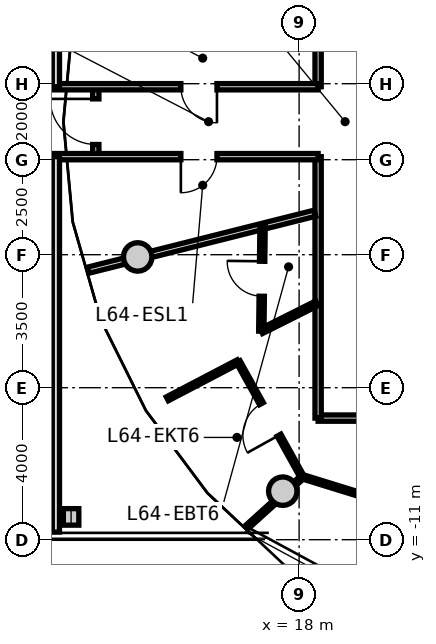
"""IFC4 building model, lengths in metres.
Left out: names, types, materials, properties, quantities, classifications, styles, units other than length and angle.
Written with IfcOpenShell. Run it as: python <this file> out.ifc"""

import sys

from ifc_helpers import new_model, si_unit, direction, frame, frame_2d, origin, origin_2d, place, context, subcontext, project, spatial, rectangle, circle, i_section, extrude, source, transform, mapped, element, fill, save


model = new_model("IFC4")
c1 = context("Model", 3, precision=1e-05, world=origin(), true_north=direction((0.0, 1.0)))
c2 = subcontext(c1, "Body", "Model", "MODEL_VIEW")
j1 = project(units=[si_unit("LENGTHUNIT", "METRE"), si_unit("PLANEANGLEUNIT", "RADIAN")], contexts=[c1])
p1 = place(None, origin())
s1 = spatial("IfcSite", under=j1, at=p1, CompositionType="ELEMENT")
p2 = place(p1, origin())
s2 = spatial("IfcBuilding", under=s1, at=p2, CompositionType="ELEMENT")
p3 = place(p2, frame((0.0, 0.0, 207.8)))
s3 = spatial("IfcBuildingStorey", under=s2, at=p3, CompositionType="ELEMENT", Elevation=207.8)
m1 = source(origin(), c2, "Body", "SweptSolid", [
    extrude(circle(Radius=0.375, at=origin_2d()), origin(), (0.0, 0.0, 1.0), 3.05),
])
for number, where, z_axis, x_axis in (
    (1, (13.753, -3.559, 0.0), (0.0, 0.0, 1.0), (1.0, 0.0, 0.0)),
    (2, (17.57, -9.723, 0.0), (0.0, 0.0, 1.0), (1.0, 0.0, 0.0)),
):
    element("IfcColumn", number, at=place(p3, frame(where, z_axis=z_axis, x_axis=x_axis)), inside=s3, PredefinedType="COLUMN", context=c2, shape_type="MappedRepresentation", body=[
        mapped(m1, transform((0.0, 0.0, 0.0), x_axis=(1.0, 0.0, 0.0), y_axis=(0.0, 1.0, 0.0), z_axis=(0.0, 0.0, 1.0), scale=1.0)),
    ])
m2 = source(origin(), c2, "Body", "SweptSolid", [
    extrude(i_section(OverallWidth=0.407, OverallDepth=0.435, WebThickness=0.024, FlangeThickness=0.039, FilletRadius=0.015, at=origin_2d()), origin(), (0.0, 0.0, 1.0), 3.05),
])
p4 = place(p3, frame((12.0, -10.4, 0.0), z_axis=(0.0, 0.0, 1.0), x_axis=(1.0, 0.0, 0.0)))
e3 = element("IfcColumn", 3, at=p4, inside=s3, PredefinedType="COLUMN", context=c2, shape_type="MappedRepresentation", body=[
    mapped(m2, transform((0.0, 0.0, 0.0), x_axis=(1.0, 0.0, 0.0), y_axis=(0.0, 1.0, 0.0), z_axis=(0.0, 0.0, 1.0), scale=1.0)),
])
m3 = source(origin(), c2, "Body", "SweptSolid", [
    extrude(rectangle(XDim=19.0, YDim=0.165, at=frame_2d((9.5, 0.0))), origin(), (0.0, 0.0, 1.0), 2.745),
])
p5 = place(p3, frame((37.5, -7.8, 0.0), z_axis=(0.0, 0.0, 1.0), x_axis=(-1.0, 0.0, 0.0)))
e4 = element("IfcWall", 4, at=p5, inside=s3, PredefinedType="PARTITIONING", context=c2, shape_type="MappedRepresentation", body=[
    mapped(m3, transform((0.0, 0.0, 0.0), x_axis=(1.0, 0.0, 0.0), y_axis=(0.0, 1.0, 0.0), z_axis=(0.0, 0.0, 1.0), scale=1.0)),
])
p6 = place(p5, frame((12.473, 0.0, 0.0)))
e5 = element("IfcOpeningElement", 5, at=p6, cuts=e4, PredefinedType="OPENING", context=c2, shape_type="SweptSolid", body=[
    extrude(rectangle(XDim=1.05, YDim=2.15, at=frame_2d((0.525, 1.075))), frame((0.0, 0.093, 0.0), z_axis=(0.0, -1.0, 0.0), x_axis=(1.0, 0.0, 0.0)), (0.0, 0.0, 1.0), 0.185),
])
m4 = source(origin(), c2, "Body", "SweptSolid", [
    extrude(rectangle(XDim=6.88, YDim=0.165, at=frame_2d((3.44, 0.0))), origin(), (0.0, 0.0, 1.0), 2.745),
])
p7 = place(p3, frame((18.5, -7.8, 0.0), z_axis=(0.0, 0.0, 1.0), x_axis=(0.0, 1.0, 0.0)))
e6 = element("IfcWall", 6, at=p7, inside=s3, PredefinedType="PARTITIONING", context=c2, shape_type="MappedRepresentation", body=[
    mapped(m4, transform((0.0, 0.0, 0.0), x_axis=(1.0, 0.0, 0.0), y_axis=(0.0, 1.0, 0.0), z_axis=(0.0, 0.0, 1.0), scale=1.0)),
])
p8 = place(p3, frame((18.5, 0.92, 0.0), z_axis=(0.0, 0.0, 1.0), x_axis=(0.0, 1.0, 0.0)))
e7 = element("IfcWall", 7, at=p8, inside=s3, PredefinedType="PARTITIONING", context=c2, shape_type="MappedRepresentation", body=[
    mapped(m4, transform((0.0, 0.0, 0.0), x_axis=(1.0, 0.0, 0.0), y_axis=(0.0, 1.0, 0.0), z_axis=(0.0, 0.0, 1.0), scale=1.0)),
])
p9 = place(p8, frame((5.525, 0.0, 0.0)))
e8 = element("IfcOpeningElement", 8, at=p9, cuts=e7, PredefinedType="OPENING", context=c2, shape_type="SweptSolid", body=[
    extrude(rectangle(XDim=0.92, YDim=2.1, at=frame_2d((0.46, 1.05))), frame((0.0, 0.093, 0.0), z_axis=(0.0, -1.0, 0.0), x_axis=(1.0, 0.0, 0.0)), (0.0, 0.0, 1.0), 0.185),
])
p10 = place(p8, frame((2.962, 0.0, 0.0)))
e9 = element("IfcOpeningElement", 9, at=p10, cuts=e7, PredefinedType="OPENING", context=c2, shape_type="SweptSolid", body=[
    extrude(rectangle(XDim=0.92, YDim=2.1, at=frame_2d((0.46, 1.05))), frame((0.0, 0.093, 0.0), z_axis=(0.0, -1.0, 0.0), x_axis=(1.0, 0.0, 0.0)), (0.0, 0.0, 1.0), 0.185),
])
m5 = source(origin(), c2, "Body", "SweptSolid", [
    extrude(rectangle(XDim=6.157, YDim=0.165, at=frame_2d((3.079, 0.0))), origin(), (0.0, 0.0, 1.0), 2.345),
])
p11 = place(p3, frame((18.42, -2.407, 0.0), z_axis=(0.0, 0.0, 1.0), x_axis=(-0.969840867184, -0.243738984038, 0.0)))
e10 = element("IfcWall", 10, at=p11, inside=s3, PredefinedType="PARTITIONING", context=c2, shape_type="MappedRepresentation", body=[
    mapped(m5, transform((0.0, 0.0, 0.0), x_axis=(1.0, 0.0, 0.0), y_axis=(0.0, 1.0, 0.0), z_axis=(0.0, 0.0, 1.0), scale=1.0)),
])
m6 = source(origin(), c2, "Body", "SweptSolid", [
    extrude(rectangle(XDim=6.98, YDim=0.115, at=frame_2d((3.49, 0.0))), origin(), (0.0, 0.0, 1.0), 2.745),
])
p12 = place(p3, frame((18.091, -9.344, 0.0), z_axis=(0.0, 0.0, 1.0), x_axis=(0.955342331637, -0.295501318749, 0.0)))
e11 = element("IfcWall", 11, at=p12, inside=s3, PredefinedType="PARTITIONING", context=c2, shape_type="MappedRepresentation", body=[
    mapped(m6, transform((0.0, 0.0, 0.0), x_axis=(1.0, 0.0, 0.0), y_axis=(0.0, 1.0, 0.0), z_axis=(0.0, 0.0, 1.0), scale=1.0)),
])
p13 = place(p12, frame((3.015, 0.0, 0.0)))
e12 = element("IfcOpeningElement", 12, at=p13, cuts=e11, PredefinedType="OPENING", context=c2, shape_type="SweptSolid", body=[
    extrude(rectangle(XDim=0.95, YDim=2.1, at=frame_2d((0.475, 1.05))), frame((0.0, 0.067, 0.0), z_axis=(0.0, -1.0, 0.0), x_axis=(1.0, 0.0, 0.0)), (0.0, 0.0, 1.0), 0.135),
])
m7 = source(origin(), c2, "Body", "SweptSolid", [
    extrude(rectangle(XDim=1.988, YDim=0.115, at=frame_2d((0.994, 0.0))), origin(), (0.0, 0.0, 1.0), 2.345),
])
p14 = place(p3, frame((18.091, -9.344, 0.0), z_axis=(0.0, 0.0, 1.0), x_axis=(-0.741992301729, -0.670408401033, 0.0)))
e13 = element("IfcWall", 13, at=p14, inside=s3, PredefinedType="PARTITIONING", context=c2, shape_type="MappedRepresentation", body=[
    mapped(m7, transform((0.0, 0.0, 0.0), x_axis=(1.0, 0.0, 0.0), y_axis=(0.0, 1.0, 0.0), z_axis=(0.0, 0.0, 1.0), scale=1.0)),
])
m8 = source(origin(), c2, "Body", "SweptSolid", [
    extrude(rectangle(XDim=1.638, YDim=0.14, at=frame_2d((0.819, 0.0))), origin(), (0.0, 0.0, 1.0), 2.745),
])
p15 = place(p3, frame((18.47, -4.778, 0.0), z_axis=(0.0, 0.0, 1.0), x_axis=(-0.893919977945, -0.448226586707, 0.0)))
e14 = element("IfcWall", 14, at=p15, inside=s3, PredefinedType="PARTITIONING", context=c2, shape_type="MappedRepresentation", body=[
    mapped(m8, transform((0.0, 0.0, 0.0), x_axis=(1.0, 0.0, 0.0), y_axis=(0.0, 1.0, 0.0), z_axis=(0.0, 0.0, 1.0), scale=1.0)),
])
m9 = source(origin(), c2, "Body", "SweptSolid", [
    extrude(rectangle(XDim=2.759, YDim=0.14, at=frame_2d((1.379, 0.0))), origin(), (0.0, 0.0, 1.0), 2.745),
])
p16 = place(p3, frame((17.005, -5.513, 0.0), z_axis=(0.0, 0.0, 1.0), x_axis=(0.01194710728, 0.999928630767, 0.0)))
e15 = element("IfcWall", 15, at=p16, inside=s3, PredefinedType="PARTITIONING", context=c2, shape_type="MappedRepresentation", body=[
    mapped(m9, transform((0.0, 0.0, 0.0), x_axis=(1.0, 0.0, 0.0), y_axis=(0.0, 1.0, 0.0), z_axis=(0.0, 0.0, 1.0), scale=1.0)),
])
p17 = place(p16, frame((0.919, 0.0, 0.0)))
e16 = element("IfcOpeningElement", 16, at=p17, cuts=e15, PredefinedType="OPENING", context=c2, shape_type="SweptSolid", body=[
    extrude(rectangle(XDim=0.92, YDim=2.1, at=frame_2d((0.46, 1.05))), frame((0.0, 0.08, 0.0), z_axis=(0.0, -1.0, 0.0), x_axis=(1.0, 0.0, 0.0)), (0.0, 0.0, 1.0), 0.16),
])
m10 = source(origin(), c2, "Body", "SweptSolid", [
    extrude(rectangle(XDim=2.104, YDim=0.115, at=frame_2d((1.052, 0.0))), origin(), (0.0, 0.0, 1.0), 2.745),
])
p18 = place(p3, frame((16.396, -6.317, 0.0), z_axis=(0.0, 0.0, 1.0), x_axis=(-0.886060817493, -0.463569010724, 0.0)))
e17 = element("IfcWall", 17, at=p18, inside=s3, PredefinedType="PARTITIONING", context=c2, shape_type="MappedRepresentation", body=[
    mapped(m10, transform((0.0, 0.0, 0.0), x_axis=(1.0, 0.0, 0.0), y_axis=(0.0, 1.0, 0.0), z_axis=(0.0, 0.0, 1.0), scale=1.0)),
])
m11 = source(origin(), c2, "Body", "SweptSolid", [
    extrude(rectangle(XDim=3.472, YDim=0.115, at=frame_2d((1.736, 0.0))), origin(), (0.0, 0.0, 1.0), 2.745),
])
p19 = place(p3, frame((16.396, -6.317, 0.0), z_axis=(0.0, 0.0, 1.0), x_axis=(0.485804139346, -0.874067696574, 0.0)))
e18 = element("IfcWall", 18, at=p19, inside=s3, PredefinedType="PARTITIONING", context=c2, shape_type="MappedRepresentation", body=[
    mapped(m11, transform((0.0, 0.0, 0.0), x_axis=(1.0, 0.0, 0.0), y_axis=(0.0, 1.0, 0.0), z_axis=(0.0, 0.0, 1.0), scale=1.0)),
])
p20 = place(p19, frame((1.261, 0.0, 0.0)))
e19 = element("IfcOpeningElement", 19, at=p20, cuts=e18, PredefinedType="OPENING", context=c2, shape_type="SweptSolid", body=[
    extrude(rectangle(XDim=0.95, YDim=2.1, at=frame_2d((0.475, 1.05))), frame((0.0, 0.067, 0.0), z_axis=(0.0, -1.0, 0.0), x_axis=(1.0, 0.0, 0.0)), (0.0, 0.0, 1.0), 0.135),
])
m12 = source(origin(), c2, "Body", "SweptSolid", [
    extrude(rectangle(XDim=1.84, YDim=0.165, at=frame_2d((0.92, 0.0))), origin(), (0.0, 0.0, 1.0), 2.745),
])
p21 = place(p3, frame((12.65, -0.92, 0.0), z_axis=(0.0, 0.0, 1.0), x_axis=(0.0, 1.0, 0.0)))
e20 = element("IfcWall", 20, at=p21, inside=s3, PredefinedType="PARTITIONING", context=c2, shape_type="MappedRepresentation", body=[
    mapped(m12, transform((0.0, 0.0, 0.0), x_axis=(1.0, 0.0, 0.0), y_axis=(0.0, 1.0, 0.0), z_axis=(0.0, 0.0, 1.0), scale=1.0)),
])
p22 = place(p21, frame((0.32, 0.0, 0.0)))
e21 = element("IfcOpeningElement", 21, at=p22, cuts=e20, PredefinedType="OPENING", context=c2, shape_type="SweptSolid", body=[
    extrude(rectangle(XDim=1.2, YDim=2.15, at=frame_2d((0.6, 1.075))), frame((0.0, 0.093, 0.0), z_axis=(0.0, -1.0, 0.0), x_axis=(1.0, 0.0, 0.0)), (0.0, 0.0, 1.0), 0.185),
])
m13 = source(origin(), c2, "Body", "SweptSolid", [
    extrude(rectangle(XDim=37.0, YDim=0.165, at=frame_2d((18.5, 0.0))), origin(), (0.0, 0.0, 1.0), 2.745),
])
p23 = place(p3, frame((-18.5, -0.92, 0.0), z_axis=(0.0, 0.0, 1.0), x_axis=(1.0, 0.0, 0.0)))
e22 = element("IfcWall", 22, at=p23, inside=s3, PredefinedType="PARTITIONING", context=c2, shape_type="MappedRepresentation", body=[
    mapped(m13, transform((0.0, 0.0, 0.0), x_axis=(1.0, 0.0, 0.0), y_axis=(0.0, 1.0, 0.0), z_axis=(0.0, 0.0, 1.0), scale=1.0)),
])
p24 = place(p23, frame((2.662, 0.0, 0.0)))
e23 = element("IfcOpeningElement", 23, at=p24, cuts=e22, PredefinedType="OPENING", context=c2, shape_type="SweptSolid", body=[
    extrude(rectangle(XDim=0.95, YDim=2.1, at=frame_2d((0.475, 1.05))), frame((0.0, 0.093, 0.0), z_axis=(0.0, -1.0, 0.0), x_axis=(1.0, 0.0, 0.0)), (0.0, 0.0, 1.0), 0.185),
])
p25 = place(p23, frame((33.388, 0.0, 0.0)))
e24 = element("IfcOpeningElement", 24, at=p25, cuts=e22, PredefinedType="OPENING", context=c2, shape_type="SweptSolid", body=[
    extrude(rectangle(XDim=0.95, YDim=2.1, at=frame_2d((0.475, 1.05))), frame((0.0, 0.093, 0.0), z_axis=(0.0, -1.0, 0.0), x_axis=(1.0, 0.0, 0.0)), (0.0, 0.0, 1.0), 0.185),
])
p26 = place(p23, frame((9.075, 0.0, 0.0)))
e25 = element("IfcOpeningElement", 25, at=p26, cuts=e22, PredefinedType="OPENING", context=c2, shape_type="SweptSolid", body=[
    extrude(rectangle(XDim=1.25, YDim=2.2, at=frame_2d((0.625, 1.1))), frame((0.0, 0.093, 0.0), z_axis=(0.0, -1.0, 0.0), x_axis=(1.0, 0.0, 0.0)), (0.0, 0.0, 1.0), 0.185),
])
p27 = place(p23, frame((14.875, 0.0, 0.0)))
e26 = element("IfcOpeningElement", 26, at=p27, cuts=e22, PredefinedType="OPENING", context=c2, shape_type="SweptSolid", body=[
    extrude(rectangle(XDim=1.25, YDim=2.2, at=frame_2d((0.625, 1.1))), frame((0.0, 0.093, 0.0), z_axis=(0.0, -1.0, 0.0), x_axis=(1.0, 0.0, 0.0)), (0.0, 0.0, 1.0), 0.185),
])
p28 = place(p23, frame((20.875, 0.0, 0.0)))
e27 = element("IfcOpeningElement", 27, at=p28, cuts=e22, PredefinedType="OPENING", context=c2, shape_type="SweptSolid", body=[
    extrude(rectangle(XDim=1.25, YDim=2.2, at=frame_2d((0.625, 1.1))), frame((0.0, 0.093, 0.0), z_axis=(0.0, -1.0, 0.0), x_axis=(1.0, 0.0, 0.0)), (0.0, 0.0, 1.0), 0.185),
])
p29 = place(p23, frame((26.675, 0.0, 0.0)))
e28 = element("IfcOpeningElement", 28, at=p29, cuts=e22, PredefinedType="OPENING", context=c2, shape_type="SweptSolid", body=[
    extrude(rectangle(XDim=1.25, YDim=2.2, at=frame_2d((0.625, 1.1))), frame((0.0, 0.093, 0.0), z_axis=(0.0, -1.0, 0.0), x_axis=(1.0, 0.0, 0.0)), (0.0, 0.0, 1.0), 0.185),
])
p30 = place(p3, frame((-18.5, 0.92, 0.0), z_axis=(0.0, 0.0, 1.0), x_axis=(1.0, 0.0, 0.0)))
e29 = element("IfcWall", 29, at=p30, inside=s3, PredefinedType="PARTITIONING", context=c2, shape_type="MappedRepresentation", body=[
    mapped(m13, transform((0.0, 0.0, 0.0), x_axis=(1.0, 0.0, 0.0), y_axis=(0.0, 1.0, 0.0), z_axis=(0.0, 0.0, 1.0), scale=1.0)),
])
p31 = place(p30, frame((2.662, 0.0, 0.0)))
e30 = element("IfcOpeningElement", 30, at=p31, cuts=e29, PredefinedType="OPENING", context=c2, shape_type="SweptSolid", body=[
    extrude(rectangle(XDim=0.95, YDim=2.1, at=frame_2d((0.475, 1.05))), frame((0.0, 0.093, 0.0), z_axis=(0.0, -1.0, 0.0), x_axis=(1.0, 0.0, 0.0)), (0.0, 0.0, 1.0), 0.185),
])
p32 = place(p30, frame((33.388, 0.0, 0.0)))
e31 = element("IfcOpeningElement", 31, at=p32, cuts=e29, PredefinedType="OPENING", context=c2, shape_type="SweptSolid", body=[
    extrude(rectangle(XDim=0.95, YDim=2.1, at=frame_2d((0.475, 1.05))), frame((0.0, 0.093, 0.0), z_axis=(0.0, -1.0, 0.0), x_axis=(1.0, 0.0, 0.0)), (0.0, 0.0, 1.0), 0.185),
])
p33 = place(p30, frame((7.64, 0.0, 0.0)))
e32 = element("IfcOpeningElement", 32, at=p33, cuts=e29, PredefinedType="OPENING", context=c2, shape_type="SweptSolid", body=[
    extrude(rectangle(XDim=0.92, YDim=2.1, at=frame_2d((0.46, 1.05))), frame((0.0, 0.093, 0.0), z_axis=(0.0, -1.0, 0.0), x_axis=(1.0, 0.0, 0.0)), (0.0, 0.0, 1.0), 0.185),
])
p34 = place(p30, frame((10.275, 0.0, 0.0)))
e33 = element("IfcOpeningElement", 33, at=p34, cuts=e29, PredefinedType="OPENING", context=c2, shape_type="SweptSolid", body=[
    extrude(rectangle(XDim=1.25, YDim=2.2, at=frame_2d((0.625, 1.1))), frame((0.0, 0.093, 0.0), z_axis=(0.0, -1.0, 0.0), x_axis=(1.0, 0.0, 0.0)), (0.0, 0.0, 1.0), 0.185),
])
p35 = place(p30, frame((14.875, 0.0, 0.0)))
e34 = element("IfcOpeningElement", 34, at=p35, cuts=e29, PredefinedType="OPENING", context=c2, shape_type="SweptSolid", body=[
    extrude(rectangle(XDim=1.25, YDim=2.2, at=frame_2d((0.625, 1.1))), frame((0.0, 0.093, 0.0), z_axis=(0.0, -1.0, 0.0), x_axis=(1.0, 0.0, 0.0)), (0.0, 0.0, 1.0), 0.185),
])
p36 = place(p30, frame((20.875, 0.0, 0.0)))
e35 = element("IfcOpeningElement", 35, at=p36, cuts=e29, PredefinedType="OPENING", context=c2, shape_type="SweptSolid", body=[
    extrude(rectangle(XDim=1.25, YDim=2.2, at=frame_2d((0.625, 1.1))), frame((0.0, 0.093, 0.0), z_axis=(0.0, -1.0, 0.0), x_axis=(1.0, 0.0, 0.0)), (0.0, 0.0, 1.0), 0.185),
])
p37 = place(p30, frame((26.675, 0.0, 0.0)))
e36 = element("IfcOpeningElement", 36, at=p37, cuts=e29, PredefinedType="OPENING", context=c2, shape_type="SweptSolid", body=[
    extrude(rectangle(XDim=1.25, YDim=2.2, at=frame_2d((0.625, 1.1))), frame((0.0, 0.093, 0.0), z_axis=(0.0, -1.0, 0.0), x_axis=(1.0, 0.0, 0.0)), (0.0, 0.0, 1.0), 0.185),
])
m14 = source(origin(), c2, "Body", "SweptSolid", [
    extrude(rectangle(XDim=9.88, YDim=0.19, at=frame_2d((4.94, 0.0))), origin(), (0.0, 0.0, 1.0), 2.745),
])
for number, where, z_axis, x_axis in (
    (37, (11.6, -10.8, 0.0), (0.0, 0.0, 1.0), (0.0, 1.0, 0.0)),
    (38, (11.6, 0.92, 0.0), (0.0, 0.0, 1.0), (0.0, 1.0, 0.0)),
):
    element("IfcWall", number, at=place(p3, frame(where, z_axis=z_axis, x_axis=x_axis)), inside=s3, PredefinedType="PARTITIONING", context=c2, shape_type="MappedRepresentation", body=[
        mapped(m14, transform((0.0, 0.0, 0.0), x_axis=(1.0, 0.0, 0.0), y_axis=(0.0, 1.0, 0.0), z_axis=(0.0, 0.0, 1.0), scale=1.0)),
    ])
m15 = source(origin(), c2, "Body", "SweptSolid", [
    extrude(rectangle(XDim=0.95, YDim=2.1, at=frame_2d((0.475, 1.05))), frame((0.0, 0.025, 0.0), z_axis=(0.0, -1.0, 0.0), x_axis=(1.0, 0.0, 0.0)), (0.0, 0.0, 1.0), 0.05),
])
p38 = place(p25, frame((0.95, 0.0, 0.0), z_axis=(0.0, 0.0, 1.0), x_axis=(-1.0, 0.0, 0.0)))
e39 = element("IfcDoor", 39, at=p38, inside=s3, OperationType="SINGLE_SWING_RIGHT", PredefinedType="DOOR", context=c2, shape_type="MappedRepresentation", body=[
    mapped(m15, transform((0.0, 0.0, 0.0), x_axis=(1.0, 0.0, 0.0), y_axis=(0.0, 1.0, 0.0), z_axis=(0.0, 0.0, 1.0), scale=1.0)),
])
fill(e24, e39)
p39 = place(p32, frame((0.95, 0.0, 0.0), z_axis=(0.0, 0.0, 1.0), x_axis=(-1.0, 0.0, 0.0)))
e40 = element("IfcDoor", 40, at=p39, inside=s3, OperationType="SINGLE_SWING_LEFT", PredefinedType="DOOR", context=c2, shape_type="MappedRepresentation", body=[
    mapped(m15, transform((0.0, 0.0, 0.0), x_axis=(1.0, 0.0, 0.0), y_axis=(0.0, 1.0, 0.0), z_axis=(0.0, 0.0, 1.0), scale=1.0)),
])
fill(e31, e40)
m16 = source(origin(), c2, "Body", "SweptSolid", [
    extrude(rectangle(XDim=0.92, YDim=2.1, at=frame_2d((0.46, 1.05))), frame((0.0, 0.025, 0.0), z_axis=(0.0, -1.0, 0.0), x_axis=(1.0, 0.0, 0.0)), (0.0, 0.0, 1.0), 0.05),
])
p40 = place(p17, origin())
e41 = element("IfcDoor", 41, at=p40, inside=s3, OperationType="SINGLE_SWING_RIGHT", PredefinedType="DOOR", context=c2, shape_type="MappedRepresentation", body=[
    mapped(m16, transform((0.0, 0.0, 0.0), x_axis=(1.0, 0.0, 0.0), y_axis=(0.0, 1.0, 0.0), z_axis=(0.0, 0.0, 1.0), scale=1.0)),
])
fill(e16, e41)
p41 = place(p20, frame((0.95, 0.0, 0.0), z_axis=(0.0, 0.0, 1.0), x_axis=(-1.0, 0.0, 0.0)))
e42 = element("IfcDoor", 42, at=p41, inside=s3, OperationType="SINGLE_SWING_LEFT", PredefinedType="DOOR", context=c2, shape_type="MappedRepresentation", body=[
    mapped(m15, transform((0.0, 0.0, 0.0), x_axis=(1.0, 0.0, 0.0), y_axis=(0.0, 1.0, 0.0), z_axis=(0.0, 0.0, 1.0), scale=1.0)),
])
fill(e19, e42)
m17 = source(origin(), c2, "Body", "SweptSolid", [
    extrude(rectangle(XDim=1.2, YDim=2.15, at=frame_2d((0.6, 1.075))), frame((0.0, 0.025, 0.0), z_axis=(0.0, -1.0, 0.0), x_axis=(1.0, 0.0, 0.0)), (0.0, 0.0, 1.0), 0.05),
])
p42 = place(p22, origin())
e43 = element("IfcDoor", 43, at=p42, inside=s3, OperationType="SINGLE_SWING_RIGHT", PredefinedType="DOOR", context=c2, shape_type="MappedRepresentation", body=[
    mapped(m17, transform((0.0, 0.0, 0.0), x_axis=(1.0, 0.0, 0.0), y_axis=(0.0, 1.0, 0.0), z_axis=(0.0, 0.0, 1.0), scale=1.0)),
])
fill(e21, e43)
save(model, sys.argv[1])
